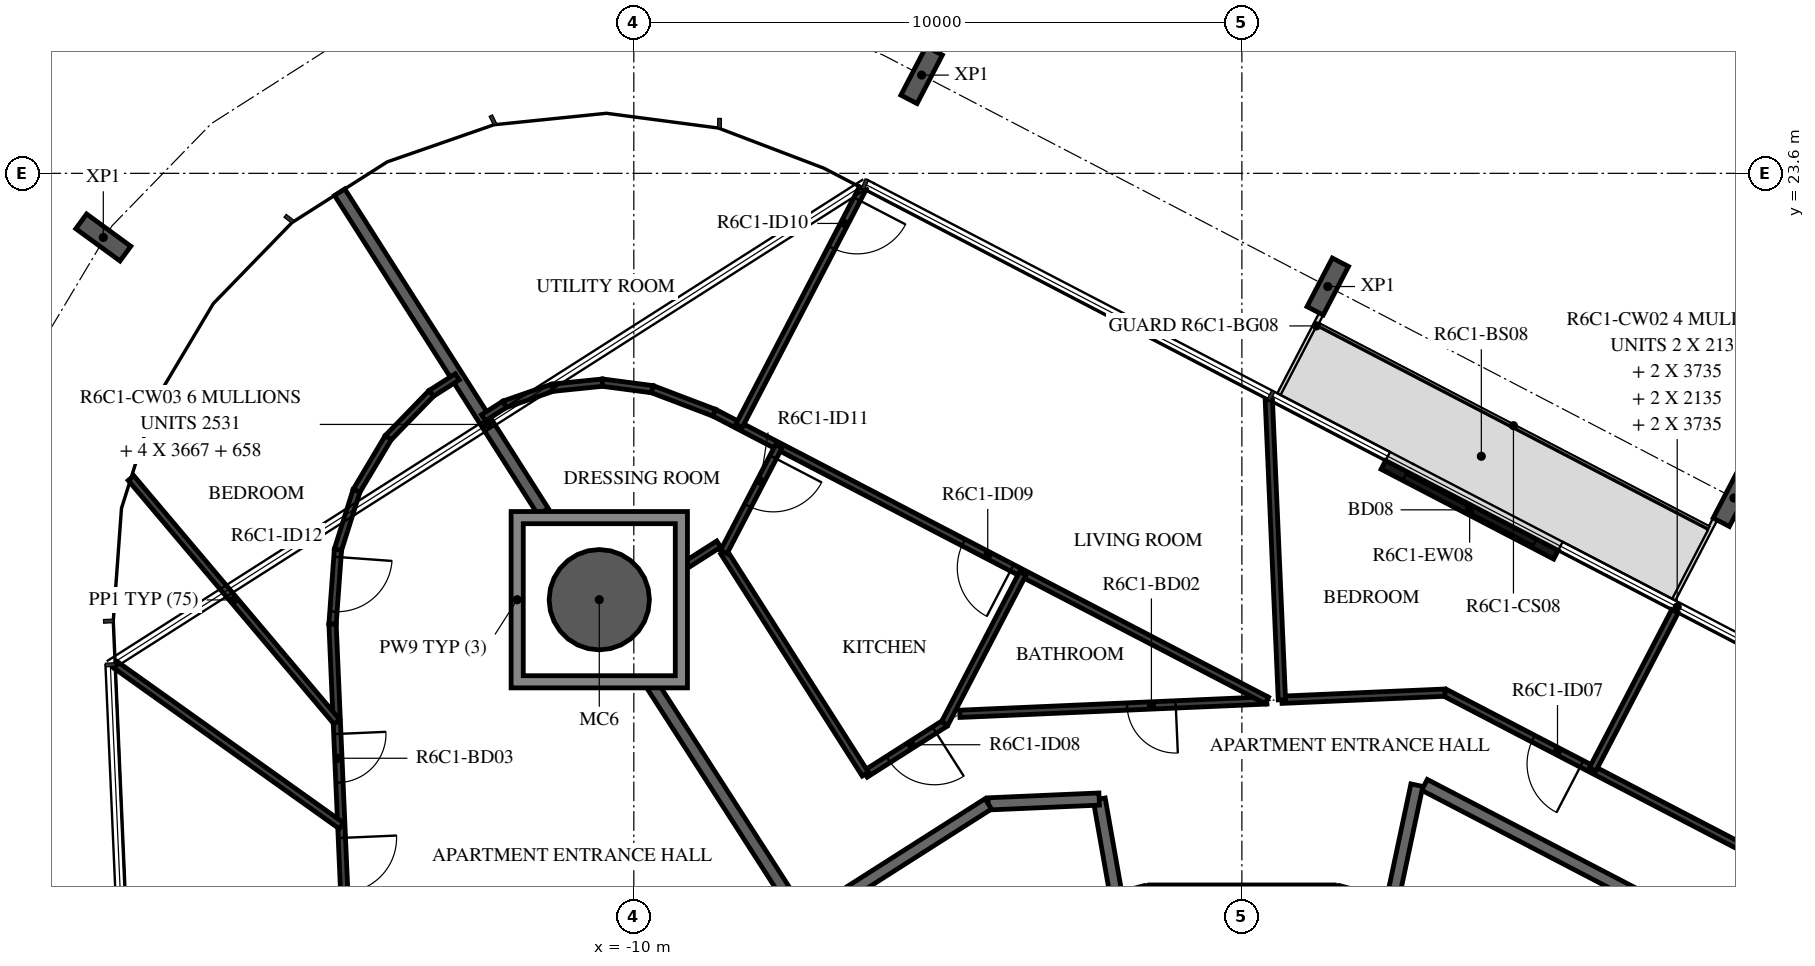
"""IFC4 building model, lengths in metres.
Left out: names, types, materials, properties, quantities, classifications, styles, units other than length and angle.
Written with IfcOpenShell. Run it as: python <this file> out.ifc"""

import sys

from ifc_helpers import new_model, si_unit, direction, frame, frame_2d, origin, origin_2d, place, context, subcontext, project, spatial, polyline, rectangle, hollow_circle, i_section, outline, extrude, element, fill, save


model = new_model("IFC4")
c1 = context("Model", 3, precision=1e-05, world=origin(), true_north=direction((0.0, 1.0)))
c2 = subcontext(c1, "Body", "Model", "MODEL_VIEW")
j1 = project(units=[si_unit("LENGTHUNIT", "METRE"), si_unit("PLANEANGLEUNIT", "RADIAN")], contexts=[c1])
p1 = place(None, origin())
s1 = spatial("IfcSite", under=j1, at=p1, CompositionType="ELEMENT")
p2 = place(p1, origin())
s2 = spatial("IfcBuilding", under=s1, at=p2, CompositionType="ELEMENT")
p3 = place(p2, frame((0.0, 0.0, 251.2)))
s3 = spatial("IfcBuildingStorey", under=s2, at=p3, CompositionType="ELEMENT", Elevation=251.2)
p4 = place(p3, frame((-10.568, 16.588, -0.38), z_axis=(0.0, 0.0, 1.0), x_axis=(1.0, 0.0, 0.0)))
e1 = element("IfcColumn", 1, at=p4, inside=s3, PredefinedType="COLUMN", context=c2, shape_type="SweptSolid", body=[
    extrude(hollow_circle(Radius=0.825, WallThickness=0.04, at=origin_2d()), origin(), (0.0, 0.0, 1.0), 3.5),
])
for number, where, z_axis, x_axis in (
    (2, (8.091, 18.261, -0.38), (0.0, 0.0, 1.0), (0.887, -0.462, 0.0)),
    (3, (1.412, 21.739, -0.38), (0.0, 0.0, 1.0), (0.887, -0.462, 0.0)),
    (4, (-5.267, 25.216, -0.38), (0.0, 0.0, 1.0), (0.887, -0.462, 0.0)),
    (5, (-18.724, 22.545, -0.38), (0.0, 0.0, 1.0), (0.59, 0.808, 0.0)),
):
    element("IfcColumn", number, at=place(p3, frame(where, z_axis=z_axis, x_axis=x_axis)), inside=s3, PredefinedType="COLUMN", context=c2, shape_type="SweptSolid", body=[
        extrude(i_section(OverallWidth=0.3, OverallDepth=0.9, WebThickness=0.019, FlangeThickness=0.035, FilletRadius=0.03, at=origin_2d()), origin(), (0.0, 0.0, 1.0), 3.5),
    ])
p5 = place(p3, frame((5.164, 17.327, 0.0), z_axis=(0.0, 0.0, 1.0), x_axis=(-0.886983100078, 0.461801884119, 0.0)))
e6 = element("IfcWall", 6, at=p5, inside=s3, PredefinedType="STANDARD", context=c2, shape_type="SweptSolid", body=[
    extrude(rectangle(XDim=3.2, YDim=0.16, at=frame_2d((1.6, 0.0))), origin(), (0.0, 0.0, 1.0), 3.12),
])
p6 = place(p5, frame((0.4, 0.0, 0.0)))
e7 = element("IfcOpeningElement", 7, at=p6, cuts=e6, PredefinedType="OPENING", context=c2, shape_type="SweptSolid", body=[
    extrude(rectangle(XDim=2.4, YDim=2.4, at=frame_2d((1.2, 1.2))), frame((0.0, 0.09, 0.0), z_axis=(0.0, -1.0, 0.0), x_axis=(1.0, 0.0, 0.0)), (0.0, 0.0, 1.0), 0.18),
])
p7 = place(p3, frame((4.479, 10.858, 0.0), z_axis=(0.0, 0.0, 1.0), x_axis=(-0.965948410781, 0.258734743916, 0.0)))
e8 = element("IfcWall", 8, at=p7, inside=s3, PredefinedType="SHEAR", context=c2, shape_type="SweptSolid", body=[
    extrude(rectangle(XDim=3.033, YDim=0.5, at=frame_2d((1.516, 0.0))), origin(), (0.0, 0.0, 1.0), 3.12),
])
p8 = place(p7, frame((1.066, 0.0, 0.0)))
e9 = element("IfcOpeningElement", 9, at=p8, cuts=e8, PredefinedType="OPENING", context=c2, shape_type="SweptSolid", body=[
    extrude(rectangle(XDim=0.9, YDim=2.1, at=frame_2d((0.45, 1.05))), frame((0.0, 0.26, 0.0), z_axis=(0.0, -1.0, 0.0), x_axis=(1.0, 0.0, 0.0)), (0.0, 0.0, 1.0), 0.52),
])
for number, where, z_axis, x_axis in (
    (10, (1.516, 11.647, 0.0), (0.0, 0.0, 1.0), (-1.0, 0.0, 0.0)),
    (11, (-1.55, 11.643, 0.0), (0.0, 0.0, 1.0), (-0.966, -0.259, 0.0)),
):
    element("IfcWall", number, at=place(p3, frame(where, z_axis=z_axis, x_axis=x_axis)), inside=s3, PredefinedType="SHEAR", context=c2, shape_type="SweptSolid", body=[
        extrude(rectangle(XDim=3.033, YDim=0.5, at=frame_2d((1.516, 0.0))), origin(), (0.0, 0.0, 1.0), 3.12),
    ])
p9 = place(p3, frame((9.372, 10.228, 0.0), z_axis=(0.0, 0.0, 1.0), x_axis=(-0.887005184532, 0.461759464021, 0.0)))
e12 = element("IfcWall", 12, at=p9, inside=s3, PredefinedType="STANDARD", context=c2, shape_type="SweptSolid", body=[
    extrude(rectangle(XDim=7.181, YDim=0.2, at=frame_2d((3.591, 0.0))), origin(), (0.0, 0.0, 1.0), 3.12),
])
p10 = place(p3, frame((2.878, 13.538, 0.0), z_axis=(0.0, 0.0, 1.0), x_axis=(-0.207893604596, -0.978151444904, 0.0)))
e13 = element("IfcWall", 13, at=p10, inside=s3, PredefinedType="STANDARD", context=c2, shape_type="SweptSolid", body=[
    extrude(rectangle(XDim=1.927, YDim=0.2, at=frame_2d((0.963, 0.0))), origin(), (0.0, 0.0, 1.0), 3.12),
])
p11 = place(p3, frame((-2.074, 11.761, 0.0), z_axis=(0.0, 0.0, 1.0), x_axis=(-0.173679082312, 0.984802303189, 0.0)))
e14 = element("IfcWall", 14, at=p11, inside=s3, PredefinedType="STANDARD", context=c2, shape_type="SweptSolid", body=[
    extrude(rectangle(XDim=1.573, YDim=0.2, at=frame_2d((0.787, 0.0))), origin(), (0.0, 0.0, 1.0), 3.12),
])
p12 = place(p3, frame((-2.347, 13.31, 0.0), z_axis=(0.0, 0.0, 1.0), x_axis=(-0.999050095671, -0.043576442492, 0.0)))
e15 = element("IfcWall", 15, at=p12, inside=s3, PredefinedType="STANDARD", context=c2, shape_type="SweptSolid", body=[
    extrude(rectangle(XDim=1.826, YDim=0.2, at=frame_2d((0.913, 0.0))), origin(), (0.0, 0.0, 1.0), 3.12),
])
p13 = place(p3, frame((-4.172, 13.231, 0.0), z_axis=(0.0, 0.0, 1.0), x_axis=(-0.843388394728, -0.537304397561, 0.0)))
e16 = element("IfcWall", 16, at=p13, inside=s3, PredefinedType="STANDARD", context=c2, shape_type="SweptSolid", body=[
    extrude(rectangle(XDim=7.181, YDim=0.2, at=frame_2d((3.59, 0.0))), origin(), (0.0, 0.0, 1.0), 3.12),
])
p14 = place(p3, frame((-9.69, 15.171, 0.0), z_axis=(0.0, 0.0, 1.0), x_axis=(0.540961372678, -0.841047438181, 0.0)))
e17 = element("IfcWall", 17, at=p14, inside=s3, PredefinedType="STANDARD", context=c2, shape_type="SweptSolid", body=[
    extrude(rectangle(XDim=4.602, YDim=0.2, at=frame_2d((2.301, 0.0))), origin(), (0.0, 0.0, 1.0), 3.12),
])
p15 = place(p3, frame((-14.837, 23.29, 0.0), z_axis=(0.0, 0.0, 1.0), x_axis=(0.537316863221, -0.843380452998, 0.0)))
e18 = element("IfcWall", 18, at=p15, inside=s3, PredefinedType="STANDARD", context=c2, shape_type="SweptSolid", body=[
    extrude(rectangle(XDim=6.227, YDim=0.2, at=frame_2d((3.113, 0.0))), origin(), (0.0, 0.0, 1.0), 3.12),
])
p16 = place(p3, frame((10.421, 11.373, 0.0), z_axis=(0.0, 0.0, 1.0), x_axis=(-0.887012970857, 0.461744506769, 0.0)))
e19 = element("IfcWall", 19, at=p16, inside=s3, PredefinedType="PARTITIONING", context=c2, shape_type="SweptSolid", body=[
    extrude(rectangle(XDim=7.985, YDim=0.12, at=frame_2d((3.992, 0.0))), origin(), (0.0, 0.0, 1.0), 3.12),
])
p17 = place(p16, frame((5.448, 0.0, 0.0)))
e20 = element("IfcOpeningElement", 20, at=p17, cuts=e19, PredefinedType="OPENING", context=c2, shape_type="SweptSolid", body=[
    extrude(rectangle(XDim=0.9, YDim=2.1, at=frame_2d((0.45, 1.05))), frame((0.0, 0.07, 0.0), z_axis=(0.0, -1.0, 0.0), x_axis=(1.0, 0.0, 0.0)), (0.0, 0.0, 1.0), 0.14),
])
p18 = place(p3, frame((3.339, 15.06, 0.0), z_axis=(0.0, 0.0, 1.0), x_axis=(-0.999045829762, -0.043674134634, 0.0)))
e21 = element("IfcWall", 21, at=p18, inside=s3, PredefinedType="PARTITIONING", context=c2, shape_type="SweptSolid", body=[
    extrude(rectangle(XDim=2.683, YDim=0.12, at=frame_2d((1.342, 0.0))), origin(), (0.0, 0.0, 1.0), 3.12),
])
p19 = place(p3, frame((0.41, 14.932, 0.0), z_axis=(0.0, 0.0, 1.0), x_axis=(-0.99904802852, -0.043623808982, 0.0)))
e22 = element("IfcWall", 22, at=p19, inside=s3, PredefinedType="PARTITIONING", context=c2, shape_type="SweptSolid", body=[
    extrude(rectangle(XDim=5.054, YDim=0.12, at=frame_2d((2.527, 0.0))), origin(), (0.0, 0.0, 1.0), 3.12),
])
p20 = place(p19, frame((1.5, 0.0, 0.0)))
e23 = element("IfcOpeningElement", 23, at=p20, cuts=e22, PredefinedType="OPENING", context=c2, shape_type="SweptSolid", body=[
    extrude(rectangle(XDim=0.8, YDim=2.1, at=frame_2d((0.4, 1.05))), frame((0.0, 0.07, 0.0), z_axis=(0.0, -1.0, 0.0), x_axis=(1.0, 0.0, 0.0)), (0.0, 0.0, 1.0), 0.14),
])
p21 = place(p3, frame((-4.888, 14.553, 0.0), z_axis=(0.0, 0.0, 1.0), x_axis=(-0.843349608892, -0.537365273517, 0.0)))
e24 = element("IfcWall", 24, at=p21, inside=s3, PredefinedType="PARTITIONING", context=c2, shape_type="SweptSolid", body=[
    extrude(rectangle(XDim=1.548, YDim=0.12, at=frame_2d((0.774, 0.0))), origin(), (0.0, 0.0, 1.0), 3.12),
])
p22 = place(p21, frame((0.2, 0.0, 0.0)))
e25 = element("IfcOpeningElement", 25, at=p22, cuts=e24, PredefinedType="OPENING", context=c2, shape_type="SweptSolid", body=[
    extrude(rectangle(XDim=0.9, YDim=2.1, at=frame_2d((0.45, 1.05))), frame((0.0, 0.07, 0.0), z_axis=(0.0, -1.0, 0.0), x_axis=(1.0, 0.0, 0.0)), (0.0, 0.0, 1.0), 0.14),
])
p23 = place(p3, frame((-6.194, 13.721, 0.0), z_axis=(0.0, 0.0, 1.0), x_axis=(-0.537316807294, 0.843380488629, 0.0)))
e26 = element("IfcWall", 26, at=p23, inside=s3, PredefinedType="PARTITIONING", context=c2, shape_type="SweptSolid", body=[
    extrude(rectangle(XDim=4.331, YDim=0.12, at=frame_2d((2.165, 0.0))), origin(), (0.0, 0.0, 1.0), 3.12),
])
p24 = place(p3, frame((-8.604, 17.504, 0.0), z_axis=(0.0, 0.0, 1.0), x_axis=(-0.843265746233, -0.537496866251, 0.0)))
e27 = element("IfcWall", 27, at=p24, inside=s3, PredefinedType="PARTITIONING", context=c2, shape_type="SweptSolid", body=[
    extrude(rectangle(XDim=0.61, YDim=0.12, at=frame_2d((0.305, 0.0))), origin(), (0.0, 0.0, 1.0), 3.12),
])
p25 = place(p3, frame((7.122, 16.399, 0.0), z_axis=(0.0, 0.0, 1.0), x_axis=(-0.461763975246, -0.887002836053, 0.0)))
e28 = element("IfcWall", 28, at=p25, inside=s3, PredefinedType="PARTITIONING", context=c2, shape_type="SweptSolid", body=[
    extrude(rectangle(XDim=2.934, YDim=0.12, at=frame_2d((1.467, 0.0))), origin(), (0.0, 0.0, 1.0), 2.73),
])
p26 = place(p3, frame((0.442, 19.876, 0.0), z_axis=(0.0, 0.0, 1.0), x_axis=(0.04366038102, -0.999046430918, 0.0)))
e29 = element("IfcWall", 29, at=p26, inside=s3, PredefinedType="PARTITIONING", context=c2, shape_type="SweptSolid", body=[
    extrude(rectangle(XDim=4.938, YDim=0.12, at=frame_2d((2.469, 0.0))), origin(), (0.0, 0.0, 1.0), 3.12),
])
p27 = place(p3, frame((0.41, 14.932, 0.0), z_axis=(0.0, 0.0, 1.0), x_axis=(-0.887012293034, 0.461745808867, 0.0)))
e30 = element("IfcWall", 30, at=p27, inside=s3, PredefinedType="PARTITIONING", context=c2, shape_type="SweptSolid", body=[
    extrude(rectangle(XDim=10.246, YDim=0.12, at=frame_2d((5.123, 0.0))), origin(), (0.0, 0.0, 1.0), 3.12),
])
p28 = place(p27, frame((4.725, 0.0, 0.0)))
e31 = element("IfcOpeningElement", 31, at=p28, cuts=e30, PredefinedType="OPENING", context=c2, shape_type="SweptSolid", body=[
    extrude(rectangle(XDim=0.9, YDim=2.1, at=frame_2d((0.45, 1.05))), frame((0.0, 0.07, 0.0), z_axis=(0.0, -1.0, 0.0), x_axis=(1.0, 0.0, 0.0)), (0.0, 0.0, 1.0), 0.14),
])
p29 = place(p3, frame((-3.603, 17.021, 0.0), z_axis=(0.0, 0.0, 1.0), x_axis=(-0.46178633653, -0.886991194654, 0.0)))
e32 = element("IfcWall", 32, at=p29, inside=s3, PredefinedType="PARTITIONING", context=c2, shape_type="SweptSolid", body=[
    extrude(rectangle(XDim=2.783, YDim=0.12, at=frame_2d((1.392, 0.0))), origin(), (0.0, 0.0, 1.0), 3.12),
])
p30 = place(p3, frame((-6.237, 23.353, 0.0), z_axis=(0.0, 0.0, 1.0), x_axis=(-0.461714347673, -0.88702866986, 0.0)))
e33 = element("IfcWall", 33, at=p30, inside=s3, PredefinedType="PARTITIONING", context=c2, shape_type="SweptSolid", body=[
    extrude(rectangle(XDim=4.4, YDim=0.12, at=frame_2d((2.2, 0.0))), origin(), (0.0, 0.0, 1.0), 2.73),
])
p31 = place(p30, frame((0.2, 0.0, 0.0)))
e34 = element("IfcOpeningElement", 34, at=p31, cuts=e33, PredefinedType="OPENING", context=c2, shape_type="SweptSolid", body=[
    extrude(rectangle(XDim=0.9, YDim=2.1, at=frame_2d((0.45, 1.05))), frame((0.0, 0.07, 0.0), z_axis=(0.0, -1.0, 0.0), x_axis=(1.0, 0.0, 0.0)), (0.0, 0.0, 1.0), 0.14),
])
p32 = place(p3, frame((-7.616, 19.11, 0.0), z_axis=(0.0, 0.0, 1.0), x_axis=(-0.461764840073, -0.887002385832, 0.0)))
e35 = element("IfcWall", 35, at=p32, inside=s3, PredefinedType="PARTITIONING", context=c2, shape_type="SweptSolid", body=[
    extrude(rectangle(XDim=1.958, YDim=0.12, at=frame_2d((0.979, 0.0))), origin(), (0.0, 0.0, 1.0), 3.12),
])
p33 = place(p32, frame((0.2, 0.0, 0.0)))
e36 = element("IfcOpeningElement", 36, at=p33, cuts=e35, PredefinedType="OPENING", context=c2, shape_type="SweptSolid", body=[
    extrude(rectangle(XDim=0.9, YDim=2.1, at=frame_2d((0.45, 1.05))), frame((0.0, 0.07, 0.0), z_axis=(0.0, -1.0, 0.0), x_axis=(1.0, 0.0, 0.0)), (0.0, 0.0, 1.0), 0.14),
])
p34 = place(p3, frame((-12.473, 19.579, 0.0), z_axis=(0.0, 0.0, 1.0), x_axis=(0.843467404643, 0.537180358264, 0.0)))
e37 = element("IfcWall", 37, at=p34, inside=s3, PredefinedType="PARTITIONING", context=c2, shape_type="SweptSolid", body=[
    extrude(rectangle(XDim=0.415, YDim=0.12, at=frame_2d((0.207, 0.0))), origin(), (0.0, 0.0, 1.0), 3.12),
])
for number, where, z_axis, x_axis in (
    (38, (-12.124, 19.802, 0.0), (0.0, 0.0, 1.0), (0.945, 0.328, 0.0)),
    (39, (-11.341, 20.074, 0.0), (0.0, 0.0, 1.0), (0.995, 0.102, 0.0)),
    (40, (-10.516, 20.158, 0.0), (0.0, 0.0, 1.0), (0.991, -0.131, 0.0)),
):
    element("IfcWall", number, at=place(p3, frame(where, z_axis=z_axis, x_axis=x_axis)), inside=s3, PredefinedType="PARTITIONING", context=c2, shape_type="SweptSolid", body=[
        extrude(rectangle(XDim=0.829, YDim=0.12, at=frame_2d((0.415, 0.0))), origin(), (0.0, 0.0, 1.0), 3.12),
    ])
p35 = place(p3, frame((-9.694, 20.05, 0.0), z_axis=(0.0, 0.0, 1.0), x_axis=(0.934647766222, -0.35557496129, 0.0)))
e41 = element("IfcWall", 41, at=p35, inside=s3, PredefinedType="PARTITIONING", context=c2, shape_type="SweptSolid", body=[
    extrude(rectangle(XDim=1.087, YDim=0.12, at=frame_2d((0.543, 0.0))), origin(), (0.0, 0.0, 1.0), 3.12),
])
p36 = place(p3, frame((-12.903, 20.254, 0.0), z_axis=(0.0, 0.0, 1.0), x_axis=(-0.843404143432, -0.537279676557, 0.0)))
e42 = element("IfcWall", 42, at=p36, inside=s3, PredefinedType="PARTITIONING", context=c2, shape_type="SweptSolid", body=[
    extrude(rectangle(XDim=0.508, YDim=0.12, at=frame_2d((0.254, 0.0))), origin(), (0.0, 0.0, 1.0), 3.12),
])
for number, where, z_axis, x_axis in (
    (43, (-13.332, 19.981, 0.0), (0.0, 0.0, 1.0), (-0.697, -0.717, 0.0)),
    (44, (-14.039, 19.252, 0.0), (0.0, 0.0, 1.0), (-0.513, -0.859, 0.0)),
    (45, (-14.56, 18.38, 0.0), (0.0, 0.0, 1.0), (-0.301, -0.954, 0.0)),
):
    element("IfcWall", number, at=place(p3, frame(where, z_axis=z_axis, x_axis=x_axis)), inside=s3, PredefinedType="PARTITIONING", context=c2, shape_type="SweptSolid", body=[
        extrude(rectangle(XDim=1.016, YDim=0.12, at=frame_2d((0.508, 0.0))), origin(), (0.0, 0.0, 1.0), 3.12),
    ])
p37 = place(p3, frame((-14.865, 17.411, 0.0), z_axis=(0.0, 0.0, 1.0), x_axis=(-0.072618457011, -0.997359794508, 0.0)))
e46 = element("IfcWall", 46, at=p37, inside=s3, PredefinedType="PARTITIONING", context=c2, shape_type="SweptSolid", body=[
    extrude(rectangle(XDim=1.227, YDim=0.12, at=frame_2d((0.614, 0.0))), origin(), (0.0, 0.0, 1.0), 3.12),
])
p38 = place(p37, frame((0.12, 0.0, 0.0)))
e47 = element("IfcOpeningElement", 47, at=p38, cuts=e46, PredefinedType="OPENING", context=c2, shape_type="SweptSolid", body=[
    extrude(rectangle(XDim=0.9, YDim=2.1, at=frame_2d((0.45, 1.05))), frame((0.0, 0.07, 0.0), z_axis=(0.0, -1.0, 0.0), x_axis=(1.0, 0.0, 0.0)), (0.0, 0.0, 1.0), 0.14),
])
p39 = place(p3, frame((-14.955, 16.187, 0.0), z_axis=(0.0, 0.0, 1.0), x_axis=(0.04360777668, -0.999048728448, 0.0)))
e48 = element("IfcWall", 48, at=p39, inside=s3, PredefinedType="PARTITIONING", context=c2, shape_type="SweptSolid", body=[
    extrude(rectangle(XDim=11.679, YDim=0.12, at=frame_2d((5.839, 0.0))), origin(), (0.0, 0.0, 1.0), 3.12),
])
p40 = place(p39, frame((1.808, 0.0, 0.0)))
e49 = element("IfcOpeningElement", 49, at=p40, cuts=e48, PredefinedType="OPENING", context=c2, shape_type="SweptSolid", body=[
    extrude(rectangle(XDim=0.8, YDim=2.1, at=frame_2d((0.4, 1.05))), frame((0.0, 0.07, 0.0), z_axis=(0.0, -1.0, 0.0), x_axis=(1.0, 0.0, 0.0)), (0.0, 0.0, 1.0), 0.14),
])
p41 = place(p39, frame((3.519, 0.0, 0.0)))
e50 = element("IfcOpeningElement", 50, at=p41, cuts=e48, PredefinedType="OPENING", context=c2, shape_type="SweptSolid", body=[
    extrude(rectangle(XDim=0.9, YDim=2.1, at=frame_2d((0.45, 1.05))), frame((0.0, 0.07, 0.0), z_axis=(0.0, -1.0, 0.0), x_axis=(1.0, 0.0, 0.0)), (0.0, 0.0, 1.0), 0.14),
])
p42 = place(p3, frame((-18.269, 18.589, 0.0), z_axis=(0.0, 0.0, 1.0), x_axis=(0.645124067673, -0.764077834588, 0.0)))
e51 = element("IfcWall", 51, at=p42, inside=s3, PredefinedType="PARTITIONING", context=c2, shape_type="SweptSolid", body=[
    extrude(rectangle(XDim=5.246, YDim=0.12, at=frame_2d((2.623, 0.0))), origin(), (0.0, 0.0, 1.0), 3.12),
])
p43 = place(p3, frame((-18.529, 15.522, 0.0), z_axis=(0.0, 0.0, 1.0), x_axis=(0.814350646776, -0.580373176582, 0.0)))
e52 = element("IfcWall", 52, at=p43, inside=s3, PredefinedType="PARTITIONING", context=c2, shape_type="SweptSolid", body=[
    extrude(rectangle(XDim=4.567, YDim=0.12, at=frame_2d((2.284, 0.0))), origin(), (0.0, 0.0, 1.0), 3.12),
])
p44 = place(p3, origin())
e53 = element("IfcWall", 53, at=p44, inside=s3, PredefinedType="STANDARD", context=c2, shape_type="SweptSolid", body=[
    extrude(outline(polyline([(-9.118, 18.038), (-9.118, 15.138), (-12.018, 15.138), (-12.018, 18.038), (-9.118, 18.038)]), holes=[polyline([(-11.818, 15.338), (-9.318, 15.338), (-9.318, 17.838), (-11.818, 17.838), (-11.818, 15.338)])]), origin(), (0.0, 0.0, 1.0), 3.12),
])
p45 = place(p6, origin())
e54 = element("IfcDoor", 54, at=p45, inside=s3, OperationType="DOUBLE_DOOR_SLIDING", PredefinedType="DOOR", context=c2, shape_type="SweptSolid", body=[
    extrude(rectangle(XDim=2.4, YDim=2.4, at=frame_2d((1.2, 1.2))), frame((0.0, 0.025, 0.0), z_axis=(0.0, -1.0, 0.0), x_axis=(1.0, 0.0, 0.0)), (0.0, 0.0, 1.0), 0.05),
])
fill(e7, e54)
p46 = place(p17, origin())
e55 = element("IfcDoor", 55, at=p46, inside=s3, OperationType="SINGLE_SWING_RIGHT", PredefinedType="DOOR", context=c2, shape_type="SweptSolid", body=[
    extrude(rectangle(XDim=0.9, YDim=2.1, at=frame_2d((0.45, 1.05))), frame((0.0, 0.025, 0.0), z_axis=(0.0, -1.0, 0.0), x_axis=(1.0, 0.0, 0.0)), (0.0, 0.0, 1.0), 0.05),
])
fill(e20, e55)
p47 = place(p20, origin())
e56 = element("IfcDoor", 56, at=p47, inside=s3, OperationType="SINGLE_SWING_RIGHT", PredefinedType="DOOR", context=c2, shape_type="SweptSolid", body=[
    extrude(rectangle(XDim=0.8, YDim=2.1, at=frame_2d((0.4, 1.05))), frame((0.0, 0.025, 0.0), z_axis=(0.0, -1.0, 0.0), x_axis=(1.0, 0.0, 0.0)), (0.0, 0.0, 1.0), 0.05),
])
fill(e23, e56)
p48 = place(p22, origin())
e57 = element("IfcDoor", 57, at=p48, inside=s3, OperationType="SINGLE_SWING_RIGHT", PredefinedType="DOOR", context=c2, shape_type="SweptSolid", body=[
    extrude(rectangle(XDim=0.9, YDim=2.1, at=frame_2d((0.45, 1.05))), frame((0.0, 0.025, 0.0), z_axis=(0.0, -1.0, 0.0), x_axis=(1.0, 0.0, 0.0)), (0.0, 0.0, 1.0), 0.05),
])
fill(e25, e57)
p49 = place(p28, origin())
e58 = element("IfcDoor", 58, at=p49, inside=s3, OperationType="SINGLE_SWING_RIGHT", PredefinedType="DOOR", context=c2, shape_type="SweptSolid", body=[
    extrude(rectangle(XDim=0.9, YDim=2.1, at=frame_2d((0.45, 1.05))), frame((0.0, 0.025, 0.0), z_axis=(0.0, -1.0, 0.0), x_axis=(1.0, 0.0, 0.0)), (0.0, 0.0, 1.0), 0.05),
])
fill(e31, e58)
p50 = place(p31, origin())
e59 = element("IfcDoor", 59, at=p50, inside=s3, OperationType="SINGLE_SWING_RIGHT", PredefinedType="DOOR", context=c2, shape_type="SweptSolid", body=[
    extrude(rectangle(XDim=0.9, YDim=2.1, at=frame_2d((0.45, 1.05))), frame((0.0, 0.025, 0.0), z_axis=(0.0, -1.0, 0.0), x_axis=(1.0, 0.0, 0.0)), (0.0, 0.0, 1.0), 0.05),
])
fill(e34, e59)
p51 = place(p33, origin())
e60 = element("IfcDoor", 60, at=p51, inside=s3, OperationType="SINGLE_SWING_RIGHT", PredefinedType="DOOR", context=c2, shape_type="SweptSolid", body=[
    extrude(rectangle(XDim=0.9, YDim=2.1, at=frame_2d((0.45, 1.05))), frame((0.0, 0.025, 0.0), z_axis=(0.0, -1.0, 0.0), x_axis=(1.0, 0.0, 0.0)), (0.0, 0.0, 1.0), 0.05),
])
fill(e36, e60)
p52 = place(p38, origin())
e61 = element("IfcDoor", 61, at=p52, inside=s3, OperationType="SINGLE_SWING_LEFT", PredefinedType="DOOR", context=c2, shape_type="SweptSolid", body=[
    extrude(rectangle(XDim=0.9, YDim=2.1, at=frame_2d((0.45, 1.05))), frame((0.0, 0.025, 0.0), z_axis=(0.0, -1.0, 0.0), x_axis=(1.0, 0.0, 0.0)), (0.0, 0.0, 1.0), 0.05),
])
fill(e47, e61)
p53 = place(p40, origin())
e62 = element("IfcDoor", 62, at=p53, inside=s3, OperationType="SINGLE_SWING_LEFT", PredefinedType="DOOR", context=c2, shape_type="SweptSolid", body=[
    extrude(rectangle(XDim=0.8, YDim=2.1, at=frame_2d((0.4, 1.05))), frame((0.0, 0.025, 0.0), z_axis=(0.0, -1.0, 0.0), x_axis=(1.0, 0.0, 0.0)), (0.0, 0.0, 1.0), 0.05),
])
fill(e49, e62)
p54 = place(p41, origin())
e63 = element("IfcDoor", 63, at=p54, inside=s3, OperationType="SINGLE_SWING_LEFT", PredefinedType="DOOR", context=c2, shape_type="SweptSolid", body=[
    extrude(rectangle(XDim=0.9, YDim=2.1, at=frame_2d((0.45, 1.05))), frame((0.0, 0.025, 0.0), z_axis=(0.0, -1.0, 0.0), x_axis=(1.0, 0.0, 0.0)), (0.0, 0.0, 1.0), 0.05),
])
fill(e50, e63)
save(model, sys.argv[1])
